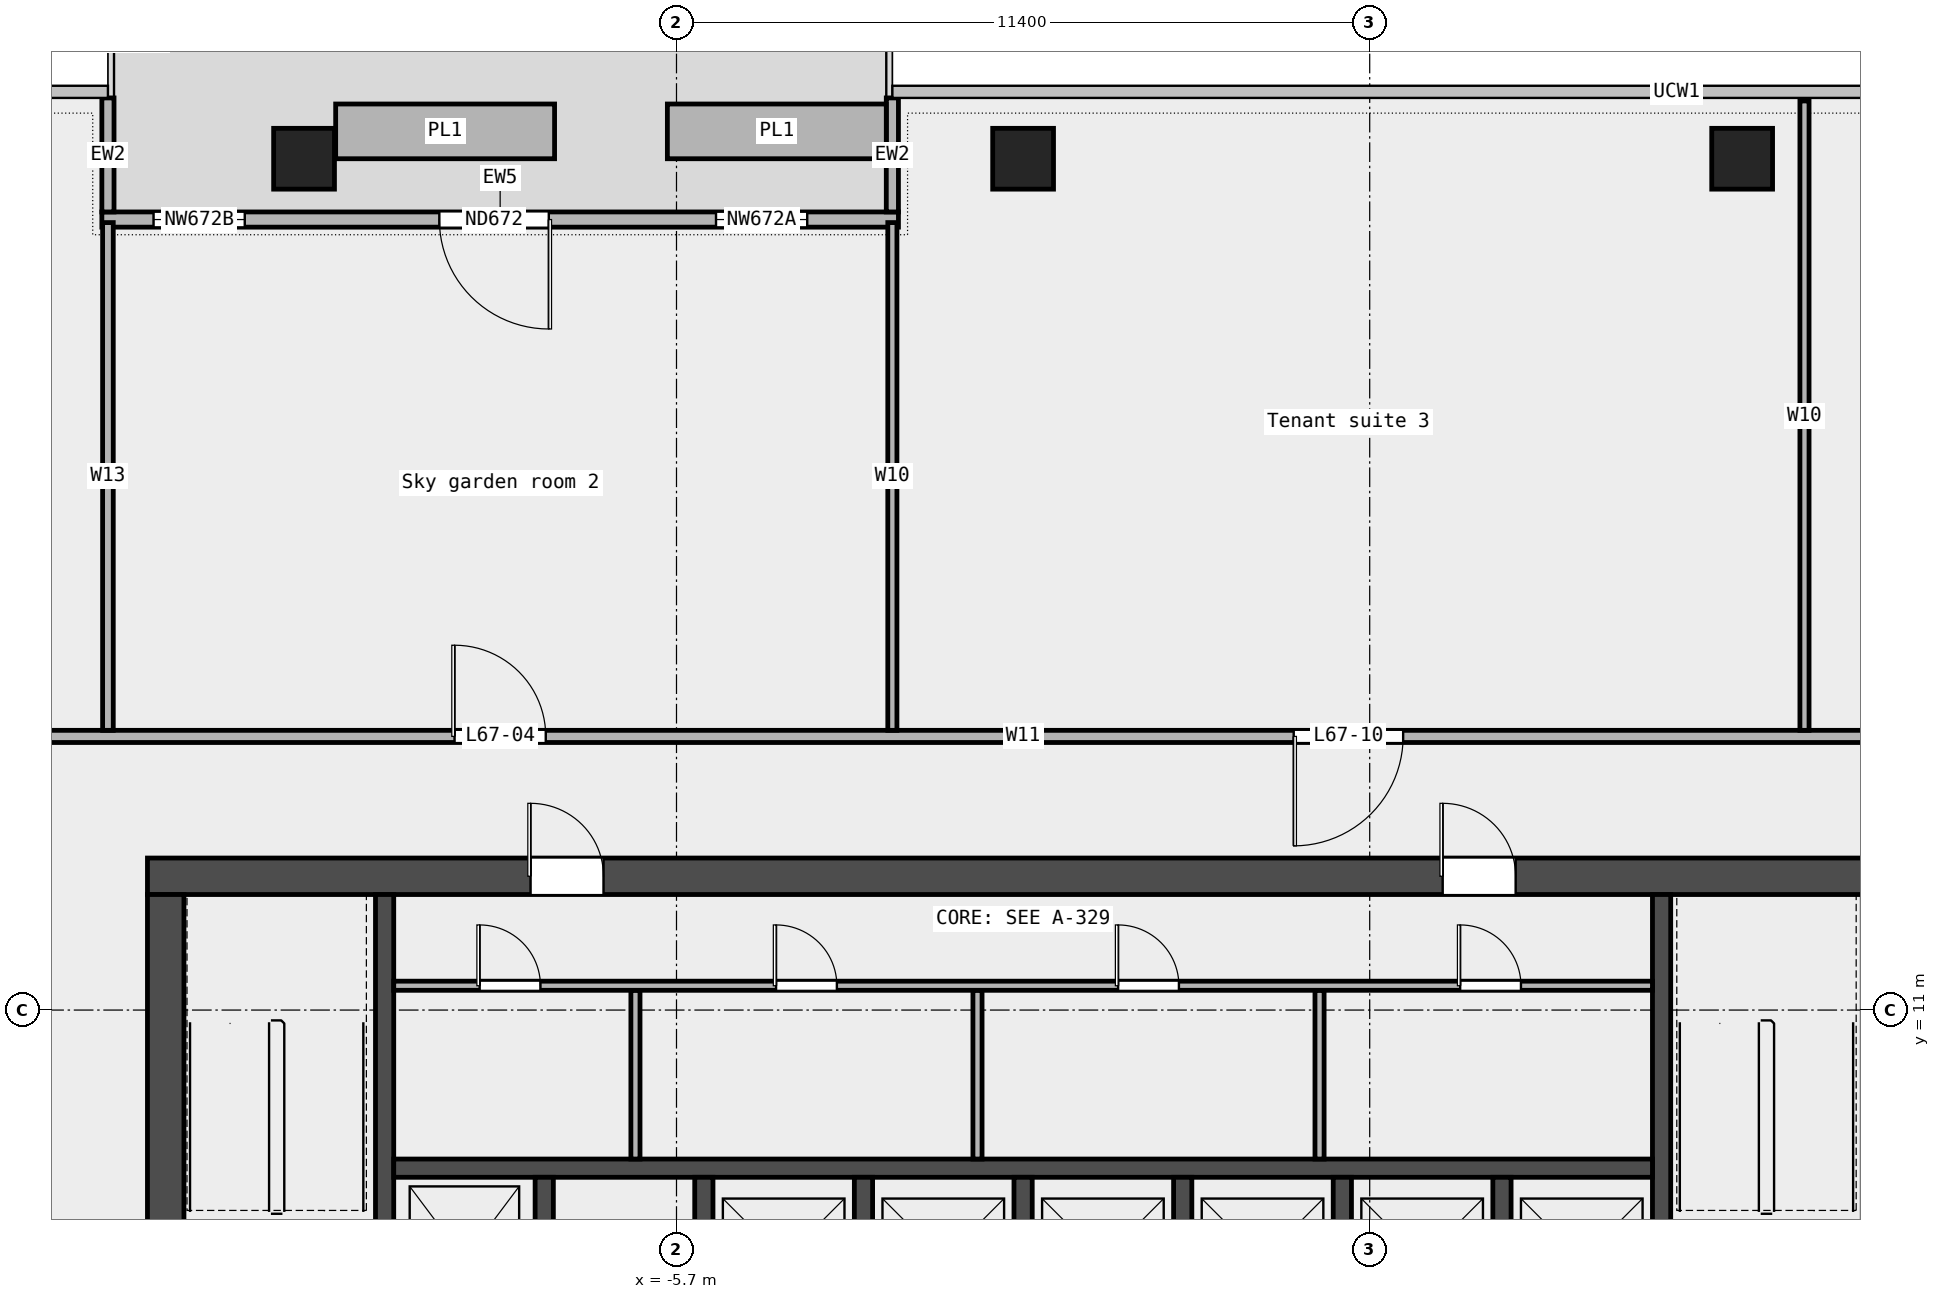
"""IFC4 building model, lengths in metres.
Left out: names, types, materials, properties, quantities, classifications, styles, units other than length and angle.
Written with IfcOpenShell. Run it as: python <this file> out.ifc"""

import sys

from ifc_helpers import new_model, si_unit, direction, frame, frame_2d, origin, origin_2d, place, context, subcontext, project, spatial, rectangle, extrude, element, fill, save


model = new_model("IFC4")
c1 = context("Model", 3, precision=1e-05, world=origin(), true_north=direction((0.0, 1.0)))
c2 = subcontext(c1, "Body", "Model", "MODEL_VIEW")
j1 = project(units=[si_unit("LENGTHUNIT", "METRE"), si_unit("PLANEANGLEUNIT", "RADIAN")], contexts=[c1])
p1 = place(None, origin())
s1 = spatial("IfcSite", under=j1, at=p1, CompositionType="ELEMENT")
p2 = place(p1, origin())
s2 = spatial("IfcBuilding", under=s1, at=p2, CompositionType="ELEMENT")
p3 = place(p2, frame((0.0, 0.0, 307.4)))
s3 = spatial("IfcBuildingStorey", under=s2, at=p3, CompositionType="ELEMENT", Elevation=307.4)
for number, where, z_axis, x_axis in (
    (1, (11.825, 25.0, 0.0), (0.0, 0.0, 1.0), (1.0, 0.0, 0.0)),
    (2, (0.0, 25.0, 0.0), (0.0, 0.0, 1.0), (1.0, 0.0, 0.0)),
    (3, (-11.825, 25.0, 0.0), (0.0, 0.0, 1.0), (1.0, 0.0, 0.0)),
):
    element("IfcColumn", number, at=place(p3, frame(where, z_axis=z_axis, x_axis=x_axis)), inside=s3, PredefinedType="COLUMN", context=c2, shape_type="SweptSolid", body=[
        extrude(rectangle(XDim=1.0, YDim=1.0, at=origin_2d()), origin(), (0.0, 0.0, 1.0), 3.6),
    ])
p4 = place(p3, frame((-2.05, 24.0, 0.0), z_axis=(0.0, 0.0, 1.0), x_axis=(-1.0, 0.0, 0.0)))
e4 = element("IfcWall", 4, at=p4, inside=s3, PredefinedType="STANDARD", context=c2, shape_type="SweptSolid", body=[
    extrude(rectangle(XDim=13.1, YDim=0.25, at=frame_2d((6.55, 0.0))), origin(), (0.0, 0.0, 1.0), 3.6),
])
p5 = place(p4, frame((1.5, 0.0, 0.45)))
e5 = element("IfcOpeningElement", 5, at=p5, cuts=e4, PredefinedType="OPENING", context=c2, shape_type="SweptSolid", body=[
    extrude(rectangle(XDim=1.5, YDim=2.4, at=frame_2d((0.75, 1.2))), frame((0.0, 0.137, 0.0), z_axis=(0.0, -1.0, 0.0), x_axis=(1.0, 0.0, 0.0)), (0.0, 0.0, 1.0), 0.274),
])
p6 = place(p4, frame((5.75, 0.0, 0.0)))
e6 = element("IfcOpeningElement", 6, at=p6, cuts=e4, PredefinedType="OPENING", context=c2, shape_type="SweptSolid", body=[
    extrude(rectangle(XDim=1.8, YDim=2.4, at=frame_2d((0.9, 1.2))), frame((0.0, 0.137, 0.0), z_axis=(0.0, -1.0, 0.0), x_axis=(1.0, 0.0, 0.0)), (0.0, 0.0, 1.0), 0.274),
])
p7 = place(p4, frame((10.75, 0.0, 0.45)))
e7 = element("IfcOpeningElement", 7, at=p7, cuts=e4, PredefinedType="OPENING", context=c2, shape_type="SweptSolid", body=[
    extrude(rectangle(XDim=1.5, YDim=2.4, at=frame_2d((0.75, 1.2))), frame((0.0, 0.137, 0.0), z_axis=(0.0, -1.0, 0.0), x_axis=(1.0, 0.0, 0.0)), (0.0, 0.0, 1.0), 0.274),
])
for number, where, z_axis, x_axis in (
    (8, (-2.15, 26.0, 0.0), (0.0, 0.0, 1.0), (0.0, -1.0, 0.0)),
    (9, (-15.05, 26.0, 0.0), (0.0, 0.0, 1.0), (0.0, -1.0, 0.0)),
):
    element("IfcWall", number, at=place(p3, frame(where, z_axis=z_axis, x_axis=x_axis)), inside=s3, PredefinedType="STANDARD", context=c2, shape_type="SweptSolid", body=[
        extrude(rectangle(XDim=1.875, YDim=0.2, at=frame_2d((0.938, 0.0))), origin(), (0.0, 0.0, 1.0), 3.6),
    ])
for number, where, z_axis, x_axis in (
    (10, (-2.25, 25.45, 0.0), (0.0, 0.0, 1.0), (-1.0, 0.0, 0.0)),
    (11, (-7.705, 25.45, 0.0), (0.0, 0.0, 1.0), (-1.0, 0.0, 0.0)),
):
    element("IfcWall", number, at=place(p3, frame(where, z_axis=z_axis, x_axis=x_axis)), inside=s3, PredefinedType="STANDARD", context=c2, shape_type="SweptSolid", body=[
        extrude(rectangle(XDim=3.6, YDim=0.9, at=frame_2d((1.8, 0.0))), origin(), (0.0, 0.0, 1.0), 0.7),
    ])
p8 = place(p3, frame((-29.6, 15.5, 0.0), z_axis=(0.0, 0.0, 1.0), x_axis=(1.0, 0.0, 0.0)))
e12 = element("IfcWall", 12, at=p8, inside=s3, PredefinedType="PARTITIONING", context=c2, shape_type="SweptSolid", body=[
    extrude(rectangle(XDim=59.2, YDim=0.2, at=frame_2d((29.6, 0.0))), origin(), (0.0, 0.0, 1.0), 3.6),
])
p9 = place(p8, frame((20.25, 0.0, 0.0)))
e13 = element("IfcOpeningElement", 13, at=p9, cuts=e12, PredefinedType="OPENING", context=c2, shape_type="SweptSolid", body=[
    extrude(rectangle(XDim=1.5, YDim=2.1, at=frame_2d((0.75, 1.05))), frame((0.0, 0.112, 0.0), z_axis=(0.0, -1.0, 0.0), x_axis=(1.0, 0.0, 0.0)), (0.0, 0.0, 1.0), 0.224),
])
p10 = place(p8, frame((49.825, 0.0, 0.0)))
e14 = element("IfcOpeningElement", 14, at=p10, cuts=e12, PredefinedType="OPENING", context=c2, shape_type="SweptSolid", body=[
    extrude(rectangle(XDim=1.8, YDim=2.1, at=frame_2d((0.9, 1.05))), frame((0.0, 0.112, 0.0), z_axis=(0.0, -1.0, 0.0), x_axis=(1.0, 0.0, 0.0)), (0.0, 0.0, 1.0), 0.224),
])
p11 = place(p8, frame((34.05, 0.0, 0.0)))
e15 = element("IfcOpeningElement", 15, at=p11, cuts=e12, PredefinedType="OPENING", context=c2, shape_type="SweptSolid", body=[
    extrude(rectangle(XDim=1.8, YDim=2.1, at=frame_2d((0.9, 1.05))), frame((0.0, 0.112, 0.0), z_axis=(0.0, -1.0, 0.0), x_axis=(1.0, 0.0, 0.0)), (0.0, 0.0, 1.0), 0.224),
])
p12 = place(p8, frame((6.625, 0.0, 0.0)))
e16 = element("IfcOpeningElement", 16, at=p12, cuts=e12, PredefinedType="OPENING", context=c2, shape_type="SweptSolid", body=[
    extrude(rectangle(XDim=1.5, YDim=2.1, at=frame_2d((0.75, 1.05))), frame((0.0, 0.112, 0.0), z_axis=(0.0, -1.0, 0.0), x_axis=(1.0, 0.0, 0.0)), (0.0, 0.0, 1.0), 0.224),
])
p13 = place(p3, frame((-15.05, 15.6, 0.0), z_axis=(0.0, 0.0, 1.0), x_axis=(0.0, 1.0, 0.0)))
e17 = element("IfcWall", 17, at=p13, inside=s3, PredefinedType="PARTITIONING", context=c2, shape_type="SweptSolid", body=[
    extrude(rectangle(XDim=8.35, YDim=0.175, at=frame_2d((4.175, 0.0))), origin(), (0.0, 0.0, 1.0), 3.6),
])
p14 = place(p3, frame((-2.15, 15.6, 0.0), z_axis=(0.0, 0.0, 1.0), x_axis=(0.0, 1.0, 0.0)))
e18 = element("IfcWall", 18, at=p14, inside=s3, PredefinedType="PARTITIONING", context=c2, shape_type="SweptSolid", body=[
    extrude(rectangle(XDim=8.35, YDim=0.15, at=frame_2d((4.175, 0.0))), origin(), (0.0, 0.0, 1.0), 3.6),
])
p15 = place(p3, frame((12.85, 15.6, 0.0), z_axis=(0.0, 0.0, 1.0), x_axis=(0.0, 1.0, 0.0)))
e19 = element("IfcWall", 19, at=p15, inside=s3, PredefinedType="PARTITIONING", context=c2, shape_type="SweptSolid", body=[
    extrude(rectangle(XDim=10.35, YDim=0.15, at=frame_2d((5.175, 0.0))), origin(), (0.0, 0.0, 1.0), 3.6),
])
p16 = place(p3, frame((-14.4, 13.2, 0.0), z_axis=(0.0, 0.0, 1.0), x_axis=(1.0, 0.0, 0.0)))
e20 = element("IfcWall", 20, at=p16, inside=s3, PredefinedType="SHEAR", context=c2, shape_type="SweptSolid", body=[
    extrude(rectangle(XDim=28.8, YDim=0.6, at=frame_2d((14.4, 0.0))), origin(), (0.0, 0.0, 1.0), 3.7),
])
p17 = place(p16, frame((6.3, 0.0, 0.0)))
e21 = element("IfcOpeningElement", 21, at=p17, cuts=e20, PredefinedType="OPENING", context=c2, shape_type="SweptSolid", body=[
    extrude(rectangle(XDim=1.2, YDim=2.1, at=frame_2d((0.6, 1.05))), frame((0.0, 0.312, 0.0), z_axis=(0.0, -1.0, 0.0), x_axis=(1.0, 0.0, 0.0)), (0.0, 0.0, 1.0), 0.624),
])
p18 = place(p16, frame((21.3, 0.0, 0.0)))
e22 = element("IfcOpeningElement", 22, at=p18, cuts=e20, PredefinedType="OPENING", context=c2, shape_type="SweptSolid", body=[
    extrude(rectangle(XDim=1.2, YDim=2.1, at=frame_2d((0.6, 1.05))), frame((0.0, 0.312, 0.0), z_axis=(0.0, -1.0, 0.0), x_axis=(1.0, 0.0, 0.0)), (0.0, 0.0, 1.0), 0.624),
])
p19 = place(p3, frame((-14.1, -6.6, 0.0), z_axis=(0.0, 0.0, 1.0), x_axis=(0.0, 1.0, 0.0)))
e23 = element("IfcWall", 23, at=p19, inside=s3, PredefinedType="SHEAR", context=c2, shape_type="SweptSolid", body=[
    extrude(rectangle(XDim=19.5, YDim=0.6, at=frame_2d((9.75, 0.0))), origin(), (0.0, 0.0, 1.0), 3.7),
])
p20 = place(p19, frame((9.3, 0.0, 0.0)))
e24 = element("IfcOpeningElement", 24, at=p20, cuts=e23, PredefinedType="OPENING", context=c2, shape_type="SweptSolid", body=[
    extrude(rectangle(XDim=1.8, YDim=2.1, at=frame_2d((0.9, 1.05))), frame((0.0, 0.312, 0.0), z_axis=(0.0, -1.0, 0.0), x_axis=(1.0, 0.0, 0.0)), (0.0, 0.0, 1.0), 0.624),
])
for number, where, z_axis, x_axis in (
    (25, (-10.5, 5.25, 0.0), (0.0, 0.0, 1.0), (0.0, 1.0, 0.0)),
    (26, (10.5, 5.25, 0.0), (0.0, 0.0, 1.0), (0.0, 1.0, 0.0)),
):
    element("IfcWall", number, at=place(p3, frame(where, z_axis=z_axis, x_axis=x_axis)), inside=s3, PredefinedType="SHEAR", context=c2, shape_type="SweptSolid", body=[
        extrude(rectangle(XDim=7.65, YDim=0.3, at=frame_2d((3.825, 0.0))), origin(), (0.0, 0.0, 1.0), 3.7),
    ])
p21 = place(p3, frame((-10.35, 8.4, 0.0), z_axis=(0.0, 0.0, 1.0), x_axis=(1.0, 0.0, 0.0)))
e27 = element("IfcWall", 27, at=p21, inside=s3, PredefinedType="SOLIDWALL", context=c2, shape_type="SweptSolid", body=[
    extrude(rectangle(XDim=20.7, YDim=0.3, at=frame_2d((10.35, 0.0))), origin(), (0.0, 0.0, 1.0), 3.7),
])
for number, where, z_axis, x_axis in (
    (28, (-7.875, 5.55, 0.0), (0.0, 0.0, 1.0), (0.0, 1.0, 0.0)),
    (29, (-5.25, 5.55, 0.0), (0.0, 0.0, 1.0), (0.0, 1.0, 0.0)),
    (30, (-2.625, 5.55, 0.0), (0.0, 0.0, 1.0), (0.0, 1.0, 0.0)),
    (31, (0.0, 5.55, 0.0), (0.0, 0.0, 1.0), (0.0, 1.0, 0.0)),
    (32, (2.625, 5.55, 0.0), (0.0, 0.0, 1.0), (0.0, 1.0, 0.0)),
    (33, (5.25, 5.55, 0.0), (0.0, 0.0, 1.0), (0.0, 1.0, 0.0)),
    (34, (7.875, 5.55, 0.0), (0.0, 0.0, 1.0), (0.0, 1.0, 0.0)),
):
    element("IfcWall", number, at=place(p3, frame(where, z_axis=z_axis, x_axis=x_axis)), inside=s3, PredefinedType="SOLIDWALL", context=c2, shape_type="SweptSolid", body=[
        extrude(rectangle(XDim=2.7, YDim=0.3, at=frame_2d((1.35, 0.0))), origin(), (0.0, 0.0, 1.0), 3.7),
    ])
for number, where, z_axis, x_axis in (
    (35, (-6.375, 8.55, 0.0), (0.0, 0.0, 1.0), (0.0, 1.0, 0.0)),
    (36, (-0.75, 8.55, 0.0), (0.0, 0.0, 1.0), (0.0, 1.0, 0.0)),
    (37, (4.875, 8.55, 0.0), (0.0, 0.0, 1.0), (0.0, 1.0, 0.0)),
):
    element("IfcWall", number, at=place(p3, frame(where, z_axis=z_axis, x_axis=x_axis)), inside=s3, PredefinedType="PARTITIONING", context=c2, shape_type="SweptSolid", body=[
        extrude(rectangle(XDim=2.775, YDim=0.15, at=frame_2d((1.387, 0.0))), origin(), (0.0, 0.0, 1.0), 3.7),
    ])
p22 = place(p3, frame((-10.35, 11.4, 0.0), z_axis=(0.0, 0.0, 1.0), x_axis=(1.0, 0.0, 0.0)))
e38 = element("IfcWall", 38, at=p22, inside=s3, PredefinedType="PARTITIONING", context=c2, shape_type="SweptSolid", body=[
    extrude(rectangle(XDim=20.7, YDim=0.15, at=frame_2d((10.35, 0.0))), origin(), (0.0, 0.0, 1.0), 3.7),
])
p23 = place(p22, frame((1.413, 0.0, 0.0)))
e39 = element("IfcOpeningElement", 39, at=p23, cuts=e38, PredefinedType="OPENING", context=c2, shape_type="SweptSolid", body=[
    extrude(rectangle(XDim=1.0, YDim=2.1, at=frame_2d((0.5, 1.05))), frame((0.0, 0.087, 0.0), z_axis=(0.0, -1.0, 0.0), x_axis=(1.0, 0.0, 0.0)), (0.0, 0.0, 1.0), 0.174),
])
p24 = place(p22, frame((6.288, 0.0, 0.0)))
e40 = element("IfcOpeningElement", 40, at=p24, cuts=e38, PredefinedType="OPENING", context=c2, shape_type="SweptSolid", body=[
    extrude(rectangle(XDim=1.0, YDim=2.1, at=frame_2d((0.5, 1.05))), frame((0.0, 0.087, 0.0), z_axis=(0.0, -1.0, 0.0), x_axis=(1.0, 0.0, 0.0)), (0.0, 0.0, 1.0), 0.174),
])
p25 = place(p22, frame((11.913, 0.0, 0.0)))
e41 = element("IfcOpeningElement", 41, at=p25, cuts=e38, PredefinedType="OPENING", context=c2, shape_type="SweptSolid", body=[
    extrude(rectangle(XDim=1.0, YDim=2.1, at=frame_2d((0.5, 1.05))), frame((0.0, 0.087, 0.0), z_axis=(0.0, -1.0, 0.0), x_axis=(1.0, 0.0, 0.0)), (0.0, 0.0, 1.0), 0.174),
])
p26 = place(p22, frame((17.538, 0.0, 0.0)))
e42 = element("IfcOpeningElement", 42, at=p26, cuts=e38, PredefinedType="OPENING", context=c2, shape_type="SweptSolid", body=[
    extrude(rectangle(XDim=1.0, YDim=2.1, at=frame_2d((0.5, 1.05))), frame((0.0, 0.087, 0.0), z_axis=(0.0, -1.0, 0.0), x_axis=(1.0, 0.0, 0.0)), (0.0, 0.0, 1.0), 0.174),
])
p27 = place(p5, origin())
e43 = element("IfcWindow", 43, at=p27, inside=s3, PartitioningType="SINGLE_PANEL", PredefinedType="WINDOW", context=c2, shape_type="SweptSolid", body=[
    extrude(rectangle(XDim=1.5, YDim=2.4, at=frame_2d((0.75, 1.2))), frame((0.0, 0.03, 0.0), z_axis=(0.0, -1.0, 0.0), x_axis=(1.0, 0.0, 0.0)), (0.0, 0.0, 1.0), 0.06),
])
fill(e5, e43)
p28 = place(p6, origin())
e44 = element("IfcDoor", 44, at=p28, inside=s3, OperationType="DOUBLE_DOOR_SINGLE_SWING", PredefinedType="DOOR", context=c2, shape_type="SweptSolid", body=[
    extrude(rectangle(XDim=1.8, YDim=2.4, at=frame_2d((0.9, 1.2))), frame((0.0, 0.025, 0.0), z_axis=(0.0, -1.0, 0.0), x_axis=(1.0, 0.0, 0.0)), (0.0, 0.0, 1.0), 0.05),
])
fill(e6, e44)
p29 = place(p7, origin())
e45 = element("IfcWindow", 45, at=p29, inside=s3, PartitioningType="SINGLE_PANEL", PredefinedType="WINDOW", context=c2, shape_type="SweptSolid", body=[
    extrude(rectangle(XDim=1.5, YDim=2.4, at=frame_2d((0.75, 1.2))), frame((0.0, 0.03, 0.0), z_axis=(0.0, -1.0, 0.0), x_axis=(1.0, 0.0, 0.0)), (0.0, 0.0, 1.0), 0.06),
])
fill(e7, e45)
p30 = place(p9, origin())
e46 = element("IfcDoor", 46, at=p30, inside=s3, OperationType="DOUBLE_DOOR_SINGLE_SWING", PredefinedType="DOOR", context=c2, shape_type="SweptSolid", body=[
    extrude(rectangle(XDim=1.5, YDim=2.1, at=frame_2d((0.75, 1.05))), frame((0.0, 0.025, 0.0), z_axis=(0.0, -1.0, 0.0), x_axis=(1.0, 0.0, 0.0)), (0.0, 0.0, 1.0), 0.05),
])
fill(e13, e46)
p31 = place(p11, origin())
e47 = element("IfcDoor", 47, at=p31, inside=s3, OperationType="DOUBLE_DOOR_SINGLE_SWING", PredefinedType="DOOR", context=c2, shape_type="SweptSolid", body=[
    extrude(rectangle(XDim=1.8, YDim=2.1, at=frame_2d((0.9, 1.05))), frame((0.0, 0.025, 0.0), z_axis=(0.0, -1.0, 0.0), x_axis=(1.0, 0.0, 0.0)), (0.0, 0.0, 1.0), 0.05),
])
fill(e15, e47)
p32 = place(p23, origin())
e48 = element("IfcDoor", 48, at=p32, inside=s3, OperationType="SINGLE_SWING_LEFT", PredefinedType="DOOR", context=c2, shape_type="SweptSolid", body=[
    extrude(rectangle(XDim=1.0, YDim=2.1, at=frame_2d((0.5, 1.05))), frame((0.0, 0.025, 0.0), z_axis=(0.0, -1.0, 0.0), x_axis=(1.0, 0.0, 0.0)), (0.0, 0.0, 1.0), 0.05),
])
fill(e39, e48)
p33 = place(p24, origin())
e49 = element("IfcDoor", 49, at=p33, inside=s3, OperationType="SINGLE_SWING_LEFT", PredefinedType="DOOR", context=c2, shape_type="SweptSolid", body=[
    extrude(rectangle(XDim=1.0, YDim=2.1, at=frame_2d((0.5, 1.05))), frame((0.0, 0.025, 0.0), z_axis=(0.0, -1.0, 0.0), x_axis=(1.0, 0.0, 0.0)), (0.0, 0.0, 1.0), 0.05),
])
fill(e40, e49)
p34 = place(p25, origin())
e50 = element("IfcDoor", 50, at=p34, inside=s3, OperationType="SINGLE_SWING_LEFT", PredefinedType="DOOR", context=c2, shape_type="SweptSolid", body=[
    extrude(rectangle(XDim=1.0, YDim=2.1, at=frame_2d((0.5, 1.05))), frame((0.0, 0.025, 0.0), z_axis=(0.0, -1.0, 0.0), x_axis=(1.0, 0.0, 0.0)), (0.0, 0.0, 1.0), 0.05),
])
fill(e41, e50)
p35 = place(p26, origin())
e51 = element("IfcDoor", 51, at=p35, inside=s3, OperationType="SINGLE_SWING_LEFT", PredefinedType="DOOR", context=c2, shape_type="SweptSolid", body=[
    extrude(rectangle(XDim=1.0, YDim=2.1, at=frame_2d((0.5, 1.05))), frame((0.0, 0.025, 0.0), z_axis=(0.0, -1.0, 0.0), x_axis=(1.0, 0.0, 0.0)), (0.0, 0.0, 1.0), 0.05),
])
fill(e42, e51)
p36 = place(p17, origin())
e52 = element("IfcDoor", 52, at=p36, inside=s3, OperationType="SINGLE_SWING_LEFT", PredefinedType="DOOR", context=c2, shape_type="SweptSolid", body=[
    extrude(rectangle(XDim=1.2, YDim=2.1, at=frame_2d((0.6, 1.05))), frame((0.0, 0.025, 0.0), z_axis=(0.0, -1.0, 0.0), x_axis=(1.0, 0.0, 0.0)), (0.0, 0.0, 1.0), 0.05),
])
fill(e21, e52)
p37 = place(p18, origin())
e53 = element("IfcDoor", 53, at=p37, inside=s3, OperationType="SINGLE_SWING_RIGHT", PredefinedType="DOOR", context=c2, shape_type="SweptSolid", body=[
    extrude(rectangle(XDim=1.2, YDim=2.1, at=frame_2d((0.6, 1.05))), frame((0.0, 0.025, 0.0), z_axis=(0.0, -1.0, 0.0), x_axis=(1.0, 0.0, 0.0)), (0.0, 0.0, 1.0), 0.05),
])
fill(e22, e53)
save(model, sys.argv[1])
